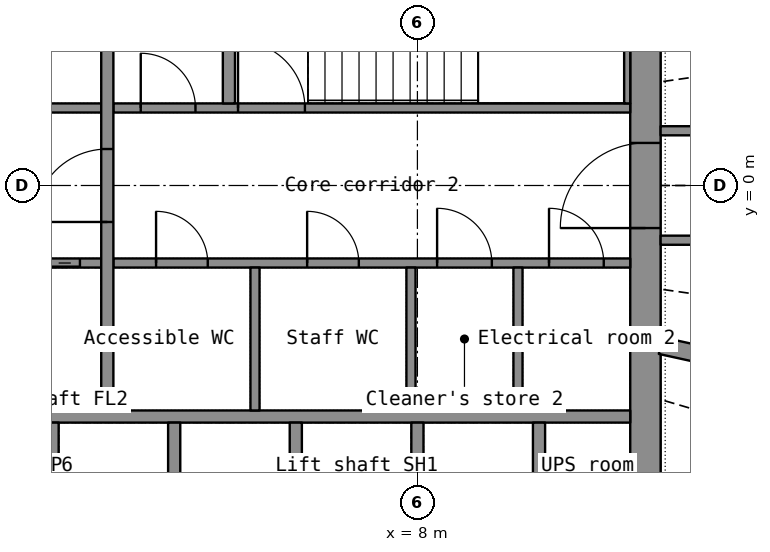
"""IFC4 building model, lengths in metres.
Left out: names, types, materials, properties, quantities, classifications, styles, units other than length and angle.
Written with IfcOpenShell. Run it as: python <this file> out.ifc"""

import sys

from ifc_helpers import new_model, si_unit, direction, frame, frame_2d, origin, place, context, subcontext, project, spatial, rectangle, extrude, element, fill, save


model = new_model("IFC4")
c1 = context("Model", 3, precision=1e-05, world=origin(), true_north=direction((0.0, 1.0)))
c2 = subcontext(c1, "Body", "Model", "MODEL_VIEW")
j1 = project(units=[si_unit("LENGTHUNIT", "METRE"), si_unit("PLANEANGLEUNIT", "RADIAN")], contexts=[c1])
p1 = place(None, origin())
s1 = spatial("IfcSite", under=j1, at=p1, CompositionType="ELEMENT")
p2 = place(p1, origin())
s2 = spatial("IfcBuilding", under=s1, at=p2, CompositionType="ELEMENT")
p3 = place(p2, frame((0.0, 0.0, 141.5)))
s3 = spatial("IfcBuildingStorey", under=s2, at=p3, CompositionType="ELEMENT", Elevation=141.5)
p4 = place(p3, frame((11.75, -7.2, 0.0), z_axis=(0.0, 0.0, 1.0), x_axis=(0.0, 1.0, 0.0)))
e1 = element("IfcWall", 1, at=p4, inside=s3, PredefinedType="SHEAR", context=c2, shape_type="SweptSolid", body=[
    extrude(rectangle(XDim=14.4, YDim=0.5, at=frame_2d((7.2, 0.0))), origin(), (0.0, 0.0, 1.0), 3.3),
])
p5 = place(p4, frame((6.5, 0.0, 0.0)))
e2 = element("IfcOpeningElement", 2, at=p5, cuts=e1, PredefinedType="OPENING", context=c2, shape_type="SweptSolid", body=[
    extrude(rectangle(XDim=1.4, YDim=2.2, at=frame_2d((0.7, 1.1))), frame((0.0, 0.26, 0.0), z_axis=(0.0, -1.0, 0.0), x_axis=(1.0, 0.0, 0.0)), (0.0, 0.0, 1.0), 0.52),
])
p6 = place(p3, frame((-11.5, -3.8, 0.0), z_axis=(0.0, 0.0, 1.0), x_axis=(1.0, 0.0, 0.0)))
e3 = element("IfcWall", 3, at=p6, inside=s3, PredefinedType="SHEAR", context=c2, shape_type="SweptSolid", body=[
    extrude(rectangle(XDim=23.0, YDim=0.2, at=frame_2d((11.5, 0.0))), origin(), (0.0, 0.0, 1.0), 3.3),
])
for number, where, z_axis, x_axis in (
    (4, (2.0, -6.7, 0.0), (0.0, 0.0, 1.0), (0.0, 1.0, 0.0)),
    (5, (4.0, -6.7, 0.0), (0.0, 0.0, 1.0), (0.0, 1.0, 0.0)),
    (6, (6.0, -6.7, 0.0), (0.0, 0.0, 1.0), (0.0, 1.0, 0.0)),
    (7, (8.0, -6.7, 0.0), (0.0, 0.0, 1.0), (0.0, 1.0, 0.0)),
    (8, (10.0, -6.7, 0.0), (0.0, 0.0, 1.0), (0.0, 1.0, 0.0)),
):
    element("IfcWall", number, at=place(p3, frame(where, z_axis=z_axis, x_axis=x_axis)), inside=s3, PredefinedType="SHEAR", context=c2, shape_type="SweptSolid", body=[
        extrude(rectangle(XDim=2.8, YDim=0.2, at=frame_2d((1.4, 0.0))), origin(), (0.0, 0.0, 1.0), 3.3),
    ])
p7 = place(p3, frame((-2.8, -1.275, 0.0), z_axis=(0.0, 0.0, 1.0), x_axis=(1.0, 0.0, 0.0)))
e9 = element("IfcWall", 9, at=p7, inside=s3, PredefinedType="SHEAR", context=c2, shape_type="SweptSolid", body=[
    extrude(rectangle(XDim=5.6, YDim=0.15, at=frame_2d((2.8, 0.0))), origin(), (0.0, 0.0, 1.0), 3.3),
])
p8 = place(p7, frame((4.15, 0.0, 0.0)))
e10 = element("IfcOpeningElement", 10, at=p8, cuts=e9, PredefinedType="OPENING", context=c2, shape_type="SweptSolid", body=[
    extrude(rectangle(XDim=1.1, YDim=2.2, at=frame_2d((0.55, 1.1))), frame((0.0, 0.085, 0.0), z_axis=(0.0, -1.0, 0.0), x_axis=(1.0, 0.0, 0.0)), (0.0, 0.0, 1.0), 0.17),
])
p9 = place(p7, frame((1.35, 0.0, 0.0)))
e11 = element("IfcOpeningElement", 11, at=p9, cuts=e9, PredefinedType="OPENING", context=c2, shape_type="SweptSolid", body=[
    extrude(rectangle(XDim=0.9, YDim=2.1, at=frame_2d((0.45, 1.05))), frame((0.0, 0.085, 0.0), z_axis=(0.0, -1.0, 0.0), x_axis=(1.0, 0.0, 0.0)), (0.0, 0.0, 1.0), 0.17),
])
p10 = place(p3, frame((3.0, -1.275, 0.0), z_axis=(0.0, 0.0, 1.0), x_axis=(1.0, 0.0, 0.0)))
e12 = element("IfcWall", 12, at=p10, inside=s3, PredefinedType="PARTITIONING", context=c2, shape_type="SweptSolid", body=[
    extrude(rectangle(XDim=8.5, YDim=0.15, at=frame_2d((4.25, 0.0))), origin(), (0.0, 0.0, 1.0), 3.3),
])
p11 = place(p10, frame((0.702, 0.0, 0.0)))
e13 = element("IfcOpeningElement", 13, at=p11, cuts=e12, PredefinedType="OPENING", context=c2, shape_type="SweptSolid", body=[
    extrude(rectangle(XDim=0.85, YDim=2.1, at=frame_2d((0.425, 1.05))), frame((0.0, 0.085, 0.0), z_axis=(0.0, -1.0, 0.0), x_axis=(1.0, 0.0, 0.0)), (0.0, 0.0, 1.0), 0.17),
])
p12 = place(p10, frame((3.187, 0.0, 0.0)))
e14 = element("IfcOpeningElement", 14, at=p12, cuts=e12, PredefinedType="OPENING", context=c2, shape_type="SweptSolid", body=[
    extrude(rectangle(XDim=0.85, YDim=2.1, at=frame_2d((0.425, 1.05))), frame((0.0, 0.085, 0.0), z_axis=(0.0, -1.0, 0.0), x_axis=(1.0, 0.0, 0.0)), (0.0, 0.0, 1.0), 0.17),
])
p13 = place(p10, frame((5.324, 0.0, 0.0)))
e15 = element("IfcOpeningElement", 15, at=p13, cuts=e12, PredefinedType="OPENING", context=c2, shape_type="SweptSolid", body=[
    extrude(rectangle(XDim=0.9, YDim=2.1, at=frame_2d((0.45, 1.05))), frame((0.0, 0.085, 0.0), z_axis=(0.0, -1.0, 0.0), x_axis=(1.0, 0.0, 0.0)), (0.0, 0.0, 1.0), 0.17),
])
p14 = place(p10, frame((7.165, 0.0, 0.0)))
e16 = element("IfcOpeningElement", 16, at=p14, cuts=e12, PredefinedType="OPENING", context=c2, shape_type="SweptSolid", body=[
    extrude(rectangle(XDim=0.9, YDim=2.1, at=frame_2d((0.45, 1.05))), frame((0.0, 0.085, 0.0), z_axis=(0.0, -1.0, 0.0), x_axis=(1.0, 0.0, 0.0)), (0.0, 0.0, 1.0), 0.17),
])
p15 = place(p3, frame((-2.8, 1.275, 0.0), z_axis=(0.0, 0.0, 1.0), x_axis=(1.0, 0.0, 0.0)))
e17 = element("IfcWall", 17, at=p15, inside=s3, PredefinedType="SHEAR", context=c2, shape_type="SweptSolid", body=[
    extrude(rectangle(XDim=5.6, YDim=0.15, at=frame_2d((2.8, 0.0))), origin(), (0.0, 0.0, 1.0), 3.3),
])
p16 = place(p15, frame((0.35, 0.0, 0.0)))
e18 = element("IfcOpeningElement", 18, at=p16, cuts=e17, PredefinedType="OPENING", context=c2, shape_type="SweptSolid", body=[
    extrude(rectangle(XDim=1.1, YDim=2.2, at=frame_2d((0.55, 1.1))), frame((0.0, 0.085, 0.0), z_axis=(0.0, -1.0, 0.0), x_axis=(1.0, 0.0, 0.0)), (0.0, 0.0, 1.0), 0.17),
])
p17 = place(p15, frame((3.35, 0.0, 0.0)))
e19 = element("IfcOpeningElement", 19, at=p17, cuts=e17, PredefinedType="OPENING", context=c2, shape_type="SweptSolid", body=[
    extrude(rectangle(XDim=0.9, YDim=2.1, at=frame_2d((0.45, 1.05))), frame((0.0, 0.085, 0.0), z_axis=(0.0, -1.0, 0.0), x_axis=(1.0, 0.0, 0.0)), (0.0, 0.0, 1.0), 0.17),
])
p18 = place(p3, frame((3.0, 1.275, 0.0), z_axis=(0.0, 0.0, 1.0), x_axis=(1.0, 0.0, 0.0)))
e20 = element("IfcWall", 20, at=p18, inside=s3, PredefinedType="SHEAR", context=c2, shape_type="SweptSolid", body=[
    extrude(rectangle(XDim=8.5, YDim=0.15, at=frame_2d((4.25, 0.0))), origin(), (0.0, 0.0, 1.0), 3.3),
])
p19 = place(p18, frame((2.05, 0.0, 0.0)))
e21 = element("IfcOpeningElement", 21, at=p19, cuts=e20, PredefinedType="OPENING", context=c2, shape_type="SweptSolid", body=[
    extrude(rectangle(XDim=1.1, YDim=2.15, at=frame_2d((0.55, 1.075))), frame((0.0, 0.085, 0.0), z_axis=(0.0, -1.0, 0.0), x_axis=(1.0, 0.0, 0.0)), (0.0, 0.0, 1.0), 0.17),
])
p20 = place(p18, frame((0.45, 0.0, 0.0)))
e22 = element("IfcOpeningElement", 22, at=p20, cuts=e20, PredefinedType="OPENING", context=c2, shape_type="SweptSolid", body=[
    extrude(rectangle(XDim=0.9, YDim=2.1, at=frame_2d((0.45, 1.05))), frame((0.0, 0.085, 0.0), z_axis=(0.0, -1.0, 0.0), x_axis=(1.0, 0.0, 0.0)), (0.0, 0.0, 1.0), 0.17),
])
p21 = place(p3, frame((2.9, -3.7, 0.0), z_axis=(0.0, 0.0, 1.0), x_axis=(0.0, 1.0, 0.0)))
e23 = element("IfcWall", 23, at=p21, inside=s3, PredefinedType="SHEAR", context=c2, shape_type="SweptSolid", body=[
    extrude(rectangle(XDim=7.4, YDim=0.2, at=frame_2d((3.7, 0.0))), origin(), (0.0, 0.0, 1.0), 3.3),
])
p22 = place(p21, frame((3.1, 0.0, 0.0)))
e24 = element("IfcOpeningElement", 24, at=p22, cuts=e23, PredefinedType="OPENING", context=c2, shape_type="SweptSolid", body=[
    extrude(rectangle(XDim=1.2, YDim=2.2, at=frame_2d((0.6, 1.1))), frame((0.0, 0.11, 0.0), z_axis=(0.0, -1.0, 0.0), x_axis=(1.0, 0.0, 0.0)), (0.0, 0.0, 1.0), 0.22),
])
p23 = place(p3, frame((11.45, 1.35, 0.0), z_axis=(0.0, 0.0, 1.0), x_axis=(0.0, 1.0, 0.0)))
e25 = element("IfcWall", 25, at=p23, inside=s3, PredefinedType="SHEAR", context=c2, shape_type="SweptSolid", body=[
    extrude(rectangle(XDim=2.35, YDim=0.1, at=frame_2d((1.175, 0.0))), origin(), (0.0, 0.0, 1.0), 3.3),
])
p24 = place(p3, frame((4.9, 1.35, 0.0), z_axis=(0.0, 0.0, 1.0), x_axis=(0.0, 1.0, 0.0)))
e26 = element("IfcWall", 26, at=p24, inside=s3, PredefinedType="SHEAR", context=c2, shape_type="SweptSolid", body=[
    extrude(rectangle(XDim=2.35, YDim=0.2, at=frame_2d((1.175, 0.0))), origin(), (0.0, 0.0, 1.0), 3.3),
])
for number, where, z_axis, x_axis in (
    (27, (5.329, -3.7, 0.0), (0.0, 0.0, 1.0), (0.0, 1.0, 0.0)),
    (28, (7.894, -3.7, 0.0), (0.0, 0.0, 1.0), (0.0, 1.0, 0.0)),
    (29, (9.654, -3.7, 0.0), (0.0, 0.0, 1.0), (0.0, 1.0, 0.0)),
):
    element("IfcWall", number, at=place(p3, frame(where, z_axis=z_axis, x_axis=x_axis)), inside=s3, PredefinedType="PARTITIONING", context=c2, shape_type="SweptSolid", body=[
        extrude(rectangle(XDim=2.35, YDim=0.15, at=frame_2d((1.175, 0.0))), origin(), (0.0, 0.0, 1.0), 3.3),
    ])
p25 = place(p3, frame((16.0, -3.512, 0.0), z_axis=(0.0, 0.0, 1.0), x_axis=(-0.976750433, 0.214379551, 0.0)))
e30 = element("IfcWall", 30, at=p25, inside=s3, PredefinedType="PARTITIONING", context=c2, shape_type="SweptSolid", body=[
    extrude(rectangle(XDim=4.095, YDim=0.28, at=frame_2d((2.048, 0.0))), origin(), (0.0, 0.0, 1.0), 2.4),
])
p26 = place(p25, frame((1.298, 0.0, 1.0)))
e31 = element("IfcOpeningElement", 31, at=p26, cuts=e30, PredefinedType="OPENING", context=c2, shape_type="SweptSolid", body=[
    extrude(rectangle(XDim=1.5, YDim=1.2, at=frame_2d((0.75, 0.6))), frame((0.0, 0.15, 0.0), z_axis=(0.0, -1.0, 0.0), x_axis=(1.0, 0.0, 0.0)), (0.0, 0.0, 1.0), 0.3),
])
p27 = place(p3, frame((12.0, -0.9, 0.0), z_axis=(0.0, 0.0, 1.0), x_axis=(1.0, 0.0, 0.0)))
e32 = element("IfcWall", 32, at=p27, inside=s3, PredefinedType="PARTITIONING", context=c2, shape_type="SweptSolid", body=[
    extrude(rectangle(XDim=4.0, YDim=0.15, at=frame_2d((2.0, 0.0))), origin(), (0.0, 0.0, 1.0), 2.4),
])
p28 = place(p27, frame((1.525, 0.0, 0.0)))
e33 = element("IfcOpeningElement", 33, at=p28, cuts=e32, PredefinedType="OPENING", context=c2, shape_type="SweptSolid", body=[
    extrude(rectangle(XDim=0.95, YDim=2.15, at=frame_2d((0.475, 1.075))), frame((0.0, 0.085, 0.0), z_axis=(0.0, -1.0, 0.0), x_axis=(1.0, 0.0, 0.0)), (0.0, 0.0, 1.0), 0.17),
])
p29 = place(p3, frame((16.0, 0.9, 0.0), z_axis=(0.0, 0.0, 1.0), x_axis=(-1.0, 0.0, 0.0)))
e34 = element("IfcWall", 34, at=p29, inside=s3, PredefinedType="PARTITIONING", context=c2, shape_type="SweptSolid", body=[
    extrude(rectangle(XDim=4.0, YDim=0.15, at=frame_2d((2.0, 0.0))), origin(), (0.0, 0.0, 1.0), 2.4),
])
p30 = place(p29, frame((1.525, 0.0, 0.0)))
e35 = element("IfcOpeningElement", 35, at=p30, cuts=e34, PredefinedType="OPENING", context=c2, shape_type="SweptSolid", body=[
    extrude(rectangle(XDim=0.95, YDim=2.15, at=frame_2d((0.475, 1.075))), frame((0.0, 0.085, 0.0), z_axis=(0.0, -1.0, 0.0), x_axis=(1.0, 0.0, 0.0)), (0.0, 0.0, 1.0), 0.17),
])
p31 = place(p5, origin())
e36 = element("IfcDoor", 36, at=p31, inside=s3, OperationType="DOUBLE_DOOR_SINGLE_SWING", PredefinedType="DOOR", context=c2, shape_type="SweptSolid", body=[
    extrude(rectangle(XDim=1.4, YDim=2.2, at=frame_2d((0.7, 1.1))), frame((0.0, 0.025, 0.0), z_axis=(0.0, -1.0, 0.0), x_axis=(1.0, 0.0, 0.0)), (0.0, 0.0, 1.0), 0.05),
])
fill(e2, e36)
p32 = place(p22, origin())
e37 = element("IfcDoor", 37, at=p32, inside=s3, OperationType="SINGLE_SWING_LEFT", PredefinedType="DOOR", context=c2, shape_type="SweptSolid", body=[
    extrude(rectangle(XDim=1.2, YDim=2.2, at=frame_2d((0.6, 1.1))), frame((0.0, 0.025, 0.0), z_axis=(0.0, -1.0, 0.0), x_axis=(1.0, 0.0, 0.0)), (0.0, 0.0, 1.0), 0.05),
])
fill(e24, e37)
p33 = place(p8, origin())
e38 = element("IfcDoor", 38, at=p33, inside=s3, OperationType="DOUBLE_DOOR_SLIDING", PredefinedType="DOOR", context=c2, shape_type="SweptSolid", body=[
    extrude(rectangle(XDim=1.1, YDim=2.2, at=frame_2d((0.55, 1.1))), frame((0.0, 0.025, 0.0), z_axis=(0.0, -1.0, 0.0), x_axis=(1.0, 0.0, 0.0)), (0.0, 0.0, 1.0), 0.05),
])
fill(e10, e38)
p34 = place(p19, origin())
e39 = element("IfcDoor", 39, at=p34, inside=s3, OperationType="SINGLE_SWING_LEFT", PredefinedType="DOOR", context=c2, shape_type="SweptSolid", body=[
    extrude(rectangle(XDim=1.1, YDim=2.15, at=frame_2d((0.55, 1.075))), frame((0.0, 0.025, 0.0), z_axis=(0.0, -1.0, 0.0), x_axis=(1.0, 0.0, 0.0)), (0.0, 0.0, 1.0), 0.05),
])
fill(e21, e39)
p35 = place(p11, origin())
e40 = element("IfcDoor", 40, at=p35, inside=s3, OperationType="SINGLE_SWING_LEFT", PredefinedType="DOOR", context=c2, shape_type="SweptSolid", body=[
    extrude(rectangle(XDim=0.85, YDim=2.1, at=frame_2d((0.425, 1.05))), frame((0.0, 0.025, 0.0), z_axis=(0.0, -1.0, 0.0), x_axis=(1.0, 0.0, 0.0)), (0.0, 0.0, 1.0), 0.05),
])
fill(e13, e40)
p36 = place(p12, origin())
e41 = element("IfcDoor", 41, at=p36, inside=s3, OperationType="SINGLE_SWING_LEFT", PredefinedType="DOOR", context=c2, shape_type="SweptSolid", body=[
    extrude(rectangle(XDim=0.85, YDim=2.1, at=frame_2d((0.425, 1.05))), frame((0.0, 0.025, 0.0), z_axis=(0.0, -1.0, 0.0), x_axis=(1.0, 0.0, 0.0)), (0.0, 0.0, 1.0), 0.05),
])
fill(e14, e41)
p37 = place(p13, origin())
e42 = element("IfcDoor", 42, at=p37, inside=s3, OperationType="SINGLE_SWING_LEFT", PredefinedType="DOOR", context=c2, shape_type="SweptSolid", body=[
    extrude(rectangle(XDim=0.9, YDim=2.1, at=frame_2d((0.45, 1.05))), frame((0.0, 0.025, 0.0), z_axis=(0.0, -1.0, 0.0), x_axis=(1.0, 0.0, 0.0)), (0.0, 0.0, 1.0), 0.05),
])
fill(e15, e42)
p38 = place(p14, origin())
e43 = element("IfcDoor", 43, at=p38, inside=s3, OperationType="SINGLE_SWING_LEFT", PredefinedType="DOOR", context=c2, shape_type="SweptSolid", body=[
    extrude(rectangle(XDim=0.9, YDim=2.1, at=frame_2d((0.45, 1.05))), frame((0.0, 0.025, 0.0), z_axis=(0.0, -1.0, 0.0), x_axis=(1.0, 0.0, 0.0)), (0.0, 0.0, 1.0), 0.05),
])
fill(e16, e43)
p39 = place(p20, origin())
e44 = element("IfcDoor", 44, at=p39, inside=s3, OperationType="SINGLE_SWING_LEFT", PredefinedType="DOOR", context=c2, shape_type="SweptSolid", body=[
    extrude(rectangle(XDim=0.9, YDim=2.1, at=frame_2d((0.45, 1.05))), frame((0.0, 0.025, 0.0), z_axis=(0.0, -1.0, 0.0), x_axis=(1.0, 0.0, 0.0)), (0.0, 0.0, 1.0), 0.05),
])
fill(e22, e44)
save(model, sys.argv[1])
